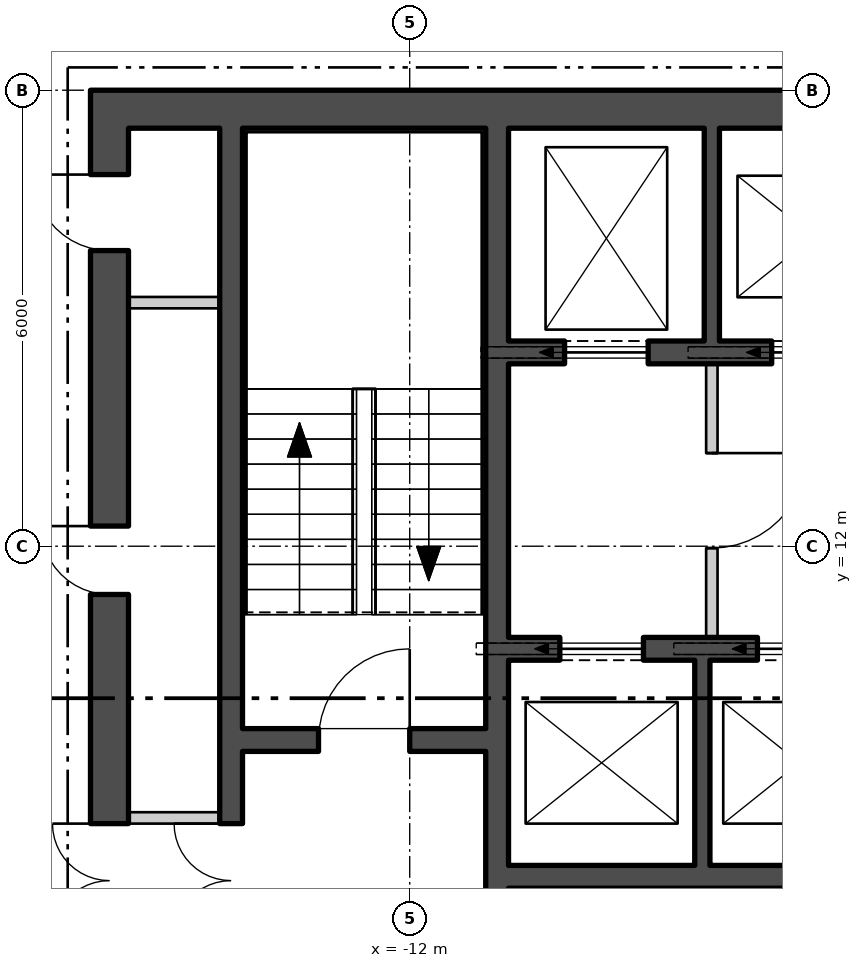
"""IFC4 building model, lengths in metres.
Left out: names, types, materials, properties, quantities, classifications, styles, units other than length and angle.
Written with IfcOpenShell. Run it as: python <this file> out.ifc"""

import sys

from ifc_helpers import new_model, si_unit, direction, frame, frame_2d, origin, place, context, subcontext, project, spatial, polyline, rectangle, outline, extrude, element, fill, save


model = new_model("IFC4")
c1 = context("Model", 3, precision=1e-05, world=origin(), true_north=direction((0.0, 1.0)))
c2 = subcontext(c1, "Body", "Model", "MODEL_VIEW")
j1 = project(units=[si_unit("LENGTHUNIT", "METRE"), si_unit("PLANEANGLEUNIT", "RADIAN")], contexts=[c1])
p1 = place(None, origin())
s1 = spatial("IfcSite", under=j1, at=p1, CompositionType="ELEMENT")
p2 = place(p1, origin())
s2 = spatial("IfcBuilding", under=s1, at=p2, CompositionType="ELEMENT")
p3 = place(p2, frame((0.0, 0.0, 186.6)))
s3 = spatial("IfcBuildingStorey", under=s2, at=p3, CompositionType="ELEMENT", Elevation=186.6)
p4 = place(p3, frame((-26.67, 13.393, -0.18), z_axis=(0.0, 0.0, 1.0), x_axis=(0.500000711659, -0.866024992908, 0.0)))
e1 = element("IfcWall", 1, at=p4, inside=s3, PredefinedType="SOLIDWALL", context=c2, shape_type="SweptSolid", body=[
    extrude(outline(polyline([(-0.13, -0.225), (45.87, -0.225), (45.61, 0.225), (0.13, 0.225), (-0.13, -0.225)])), origin(), (0.0, 0.0, 1.0), 6.0),
])
p5 = place(p4, frame((1.424, 0.0, 1.38)))
e2 = element("IfcOpeningElement", 2, at=p5, cuts=e1, PredefinedType="OPENING", context=c2, shape_type="SweptSolid", body=[
    extrude(rectangle(XDim=2.4, YDim=3.6, at=frame_2d((1.2, 1.8))), frame((0.0, 0.235, 0.0), z_axis=(0.0, -1.0, 0.0), x_axis=(1.0, 0.0, 0.0)), (0.0, 0.0, 1.0), 0.47),
])
p6 = place(p4, frame((5.893, 0.0, 1.38)))
e3 = element("IfcOpeningElement", 3, at=p6, cuts=e1, PredefinedType="OPENING", context=c2, shape_type="SweptSolid", body=[
    extrude(rectangle(XDim=2.4, YDim=3.6, at=frame_2d((1.2, 1.8))), frame((0.0, 0.235, 0.0), z_axis=(0.0, -1.0, 0.0), x_axis=(1.0, 0.0, 0.0)), (0.0, 0.0, 1.0), 0.47),
])
p7 = place(p4, frame((10.401, 0.0, 1.38)))
e4 = element("IfcOpeningElement", 4, at=p7, cuts=e1, PredefinedType="OPENING", context=c2, shape_type="SweptSolid", body=[
    extrude(rectangle(XDim=2.4, YDim=3.6, at=frame_2d((1.2, 1.8))), frame((0.0, 0.235, 0.0), z_axis=(0.0, -1.0, 0.0), x_axis=(1.0, 0.0, 0.0)), (0.0, 0.0, 1.0), 0.47),
])
p8 = place(p4, frame((14.909, 0.0, 1.38)))
e5 = element("IfcOpeningElement", 5, at=p8, cuts=e1, PredefinedType="OPENING", context=c2, shape_type="SweptSolid", body=[
    extrude(rectangle(XDim=2.4, YDim=3.6, at=frame_2d((1.2, 1.8))), frame((0.0, 0.235, 0.0), z_axis=(0.0, -1.0, 0.0), x_axis=(1.0, 0.0, 0.0)), (0.0, 0.0, 1.0), 0.47),
])
p9 = place(p4, frame((19.416, 0.0, 1.38)))
e6 = element("IfcOpeningElement", 6, at=p9, cuts=e1, PredefinedType="OPENING", context=c2, shape_type="SweptSolid", body=[
    extrude(rectangle(XDim=2.4, YDim=3.6, at=frame_2d((1.2, 1.8))), frame((0.0, 0.235, 0.0), z_axis=(0.0, -1.0, 0.0), x_axis=(1.0, 0.0, 0.0)), (0.0, 0.0, 1.0), 0.47),
])
p10 = place(p4, frame((23.924, 0.0, 1.38)))
e7 = element("IfcOpeningElement", 7, at=p10, cuts=e1, PredefinedType="OPENING", context=c2, shape_type="SweptSolid", body=[
    extrude(rectangle(XDim=2.4, YDim=3.6, at=frame_2d((1.2, 1.8))), frame((0.0, 0.235, 0.0), z_axis=(0.0, -1.0, 0.0), x_axis=(1.0, 0.0, 0.0)), (0.0, 0.0, 1.0), 0.47),
])
p11 = place(p4, frame((28.431, 0.0, 1.38)))
e8 = element("IfcOpeningElement", 8, at=p11, cuts=e1, PredefinedType="OPENING", context=c2, shape_type="SweptSolid", body=[
    extrude(rectangle(XDim=2.4, YDim=3.6, at=frame_2d((1.2, 1.8))), frame((0.0, 0.235, 0.0), z_axis=(0.0, -1.0, 0.0), x_axis=(1.0, 0.0, 0.0)), (0.0, 0.0, 1.0), 0.47),
])
p12 = place(p4, frame((32.939, 0.0, 1.38)))
e9 = element("IfcOpeningElement", 9, at=p12, cuts=e1, PredefinedType="OPENING", context=c2, shape_type="SweptSolid", body=[
    extrude(rectangle(XDim=2.4, YDim=3.6, at=frame_2d((1.2, 1.8))), frame((0.0, 0.235, 0.0), z_axis=(0.0, -1.0, 0.0), x_axis=(1.0, 0.0, 0.0)), (0.0, 0.0, 1.0), 0.47),
])
p13 = place(p4, frame((37.447, 0.0, 1.38)))
e10 = element("IfcOpeningElement", 10, at=p13, cuts=e1, PredefinedType="OPENING", context=c2, shape_type="SweptSolid", body=[
    extrude(rectangle(XDim=2.4, YDim=3.6, at=frame_2d((1.2, 1.8))), frame((0.0, 0.235, 0.0), z_axis=(0.0, -1.0, 0.0), x_axis=(1.0, 0.0, 0.0)), (0.0, 0.0, 1.0), 0.47),
])
p14 = place(p4, frame((41.916, 0.0, 1.38)))
e11 = element("IfcOpeningElement", 11, at=p14, cuts=e1, PredefinedType="OPENING", context=c2, shape_type="SweptSolid", body=[
    extrude(rectangle(XDim=2.4, YDim=3.6, at=frame_2d((1.2, 1.8))), frame((0.0, 0.235, 0.0), z_axis=(0.0, -1.0, 0.0), x_axis=(1.0, 0.0, 0.0)), (0.0, 0.0, 1.0), 0.47),
])
p15 = place(p3, frame((-16.2, 17.75, 0.0), z_axis=(0.0, 0.0, 1.0), x_axis=(1.0, 0.0, 0.0)))
e12 = element("IfcWall", 12, at=p15, inside=s3, PredefinedType="SHEAR", context=c2, shape_type="SweptSolid", body=[
    extrude(rectangle(XDim=32.4, YDim=0.5, at=frame_2d((16.2, 0.0))), origin(), (0.0, 0.0, 1.0), 5.8),
])
p16 = place(p3, frame((-15.95, 2.5, 0.0), z_axis=(0.0, 0.0, 1.0), x_axis=(0.0, 1.0, 0.0)))
e13 = element("IfcWall", 13, at=p16, inside=s3, PredefinedType="SHEAR", context=c2, shape_type="SweptSolid", body=[
    extrude(rectangle(XDim=15.0, YDim=0.5, at=frame_2d((7.5, 0.0))), origin(), (0.0, 0.0, 1.0), 5.8),
])
p17 = place(p16, frame((4.35, 0.0, 0.0)))
e14 = element("IfcOpeningElement", 14, at=p17, cuts=e13, PredefinedType="OPENING", context=c2, shape_type="SweptSolid", body=[
    extrude(rectangle(XDim=1.5, YDim=2.1, at=frame_2d((0.75, 1.05))), frame((0.0, 0.26, 0.0), z_axis=(0.0, -1.0, 0.0), x_axis=(1.0, 0.0, 0.0)), (0.0, 0.0, 1.0), 0.52),
])
p18 = place(p16, frame((0.798, 0.0, 0.0)))
e15 = element("IfcOpeningElement", 15, at=p18, cuts=e13, PredefinedType="OPENING", context=c2, shape_type="SweptSolid", body=[
    extrude(rectangle(XDim=0.9, YDim=2.1, at=frame_2d((0.45, 1.05))), frame((0.0, 0.26, 0.0), z_axis=(0.0, -1.0, 0.0), x_axis=(1.0, 0.0, 0.0)), (0.0, 0.0, 1.0), 0.52),
])
p19 = place(p16, frame((2.973, 0.0, 0.0)))
e16 = element("IfcOpeningElement", 16, at=p19, cuts=e13, PredefinedType="OPENING", context=c2, shape_type="SweptSolid", body=[
    extrude(rectangle(XDim=0.9, YDim=2.1, at=frame_2d((0.45, 1.05))), frame((0.0, 0.26, 0.0), z_axis=(0.0, -1.0, 0.0), x_axis=(1.0, 0.0, 0.0)), (0.0, 0.0, 1.0), 0.52),
])
p20 = place(p16, frame((8.865, 0.0, 0.0)))
e17 = element("IfcOpeningElement", 17, at=p20, cuts=e13, PredefinedType="OPENING", context=c2, shape_type="SweptSolid", body=[
    extrude(rectangle(XDim=0.9, YDim=2.1, at=frame_2d((0.45, 1.05))), frame((0.0, 0.26, 0.0), z_axis=(0.0, -1.0, 0.0), x_axis=(1.0, 0.0, 0.0)), (0.0, 0.0, 1.0), 0.52),
])
p21 = place(p16, frame((13.39, 0.0, 0.0)))
e18 = element("IfcOpeningElement", 18, at=p21, cuts=e13, PredefinedType="OPENING", context=c2, shape_type="SweptSolid", body=[
    extrude(rectangle(XDim=1.0, YDim=2.1, at=frame_2d((0.5, 1.05))), frame((0.0, 0.26, 0.0), z_axis=(0.0, -1.0, 0.0), x_axis=(1.0, 0.0, 0.0)), (0.0, 0.0, 1.0), 0.52),
])
p22 = place(p3, frame((-10.85, 2.5, 0.0), z_axis=(0.0, 0.0, 1.0), x_axis=(0.0, 1.0, 0.0)))
e19 = element("IfcWall", 19, at=p22, inside=s3, PredefinedType="SHEAR", context=c2, shape_type="SweptSolid", body=[
    extrude(rectangle(XDim=15.0, YDim=0.3, at=frame_2d((7.5, 0.0))), origin(), (0.0, 0.0, 1.0), 5.8),
])
p23 = place(p22, frame((3.475, 0.0, 0.0)))
e20 = element("IfcOpeningElement", 20, at=p23, cuts=e19, PredefinedType="OPENING", context=c2, shape_type="SweptSolid", body=[
    extrude(rectangle(XDim=1.25, YDim=2.1, at=frame_2d((0.625, 1.05))), frame((0.0, 0.16, 0.0), z_axis=(0.0, -1.0, 0.0), x_axis=(1.0, 0.0, 0.0)), (0.0, 0.0, 1.0), 0.32),
])
p24 = place(p22, frame((1.125, 0.0, 0.0)))
e21 = element("IfcOpeningElement", 21, at=p24, cuts=e19, PredefinedType="OPENING", context=c2, shape_type="SweptSolid", body=[
    extrude(rectangle(XDim=1.0, YDim=2.1, at=frame_2d((0.5, 1.05))), frame((0.0, 0.16, 0.0), z_axis=(0.0, -1.0, 0.0), x_axis=(1.0, 0.0, 0.0)), (0.0, 0.0, 1.0), 0.32),
])
p25 = place(p3, frame((-14.35, 2.5, 0.0), z_axis=(0.0, 0.0, 1.0), x_axis=(0.0, 1.0, 0.0)))
e22 = element("IfcWall", 22, at=p25, inside=s3, PredefinedType="SHEAR", context=c2, shape_type="SweptSolid", body=[
    extrude(rectangle(XDim=15.0, YDim=0.3, at=frame_2d((7.5, 0.0))), origin(), (0.0, 0.0, 1.0), 5.8),
])
p26 = place(p25, frame((4.35, 0.0, 0.0)))
e23 = element("IfcOpeningElement", 23, at=p26, cuts=e22, PredefinedType="OPENING", context=c2, shape_type="SweptSolid", body=[
    extrude(rectangle(XDim=1.5, YDim=2.1, at=frame_2d((0.75, 1.05))), frame((0.0, 0.16, 0.0), z_axis=(0.0, -1.0, 0.0), x_axis=(1.0, 0.0, 0.0)), (0.0, 0.0, 1.0), 0.32),
])
p27 = place(p3, frame((-14.2, 9.45, 0.0), z_axis=(0.0, 0.0, 1.0), x_axis=(1.0, 0.0, 0.0)))
e24 = element("IfcWall", 24, at=p27, inside=s3, PredefinedType="SHEAR", context=c2, shape_type="SweptSolid", body=[
    extrude(rectangle(XDim=3.2, YDim=0.3, at=frame_2d((1.6, 0.0))), origin(), (0.0, 0.0, 1.0), 5.8),
])
p28 = place(p27, frame((1.0, 0.0, 0.0)))
e25 = element("IfcOpeningElement", 25, at=p28, cuts=e24, PredefinedType="OPENING", context=c2, shape_type="SweptSolid", body=[
    extrude(rectangle(XDim=1.2, YDim=2.1, at=frame_2d((0.6, 1.05))), frame((0.0, 0.16, 0.0), z_axis=(0.0, -1.0, 0.0), x_axis=(1.0, 0.0, 0.0)), (0.0, 0.0, 1.0), 0.32),
])
p29 = place(p3, frame((-10.7, 14.55, 0.0), z_axis=(0.0, 0.0, 1.0), x_axis=(1.0, 0.0, 0.0)))
e26 = element("IfcWall", 26, at=p29, inside=s3, PredefinedType="SHEAR", context=c2, shape_type="SweptSolid", body=[
    extrude(rectangle(XDim=21.4, YDim=0.3, at=frame_2d((10.7, 0.0))), origin(), (0.0, 0.0, 1.0), 5.8),
])
p30 = place(p29, frame((0.738, 0.0, 0.0)))
e27 = element("IfcOpeningElement", 27, at=p30, cuts=e26, PredefinedType="OPENING", context=c2, shape_type="SweptSolid", body=[
    extrude(rectangle(XDim=1.1, YDim=2.1, at=frame_2d((0.55, 1.05))), frame((0.0, 0.16, 0.0), z_axis=(0.0, -1.0, 0.0), x_axis=(1.0, 0.0, 0.0)), (0.0, 0.0, 1.0), 0.32),
])
p31 = place(p29, frame((3.462, 0.0, 0.0)))
e28 = element("IfcOpeningElement", 28, at=p31, cuts=e26, PredefinedType="OPENING", context=c2, shape_type="SweptSolid", body=[
    extrude(rectangle(XDim=1.1, YDim=2.1, at=frame_2d((0.55, 1.05))), frame((0.0, 0.16, 0.0), z_axis=(0.0, -1.0, 0.0), x_axis=(1.0, 0.0, 0.0)), (0.0, 0.0, 1.0), 0.32),
])
p32 = place(p29, frame((6.138, 0.0, 0.0)))
e29 = element("IfcOpeningElement", 29, at=p32, cuts=e26, PredefinedType="OPENING", context=c2, shape_type="SweptSolid", body=[
    extrude(rectangle(XDim=1.1, YDim=2.1, at=frame_2d((0.55, 1.05))), frame((0.0, 0.16, 0.0), z_axis=(0.0, -1.0, 0.0), x_axis=(1.0, 0.0, 0.0)), (0.0, 0.0, 1.0), 0.32),
])
p33 = place(p29, frame((8.812, 0.0, 0.0)))
e30 = element("IfcOpeningElement", 30, at=p33, cuts=e26, PredefinedType="OPENING", context=c2, shape_type="SweptSolid", body=[
    extrude(rectangle(XDim=1.1, YDim=2.1, at=frame_2d((0.55, 1.05))), frame((0.0, 0.16, 0.0), z_axis=(0.0, -1.0, 0.0), x_axis=(1.0, 0.0, 0.0)), (0.0, 0.0, 1.0), 0.32),
])
p34 = place(p29, frame((19.562, 0.0, 0.0)))
e31 = element("IfcOpeningElement", 31, at=p34, cuts=e26, PredefinedType="OPENING", context=c2, shape_type="SweptSolid", body=[
    extrude(rectangle(XDim=1.1, YDim=2.1, at=frame_2d((0.55, 1.05))), frame((0.0, 0.16, 0.0), z_axis=(0.0, -1.0, 0.0), x_axis=(1.0, 0.0, 0.0)), (0.0, 0.0, 1.0), 0.32),
])
p35 = place(p29, frame((14.213, 0.0, 0.0)))
e32 = element("IfcOpeningElement", 32, at=p35, cuts=e26, PredefinedType="OPENING", context=c2, shape_type="SweptSolid", body=[
    extrude(rectangle(XDim=1.0, YDim=2.1, at=frame_2d((0.5, 1.05))), frame((0.0, 0.16, 0.0), z_axis=(0.0, -1.0, 0.0), x_axis=(1.0, 0.0, 0.0)), (0.0, 0.0, 1.0), 0.32),
])
p36 = place(p3, frame((-10.7, 10.65, 0.0), z_axis=(0.0, 0.0, 1.0), x_axis=(1.0, 0.0, 0.0)))
e33 = element("IfcWall", 33, at=p36, inside=s3, PredefinedType="SHEAR", context=c2, shape_type="SweptSolid", body=[
    extrude(rectangle(XDim=10.3, YDim=0.3, at=frame_2d((5.15, 0.0))), origin(), (0.0, 0.0, 1.0), 5.8),
])
p37 = place(p36, frame((0.675, 0.0, 0.0)))
e34 = element("IfcOpeningElement", 34, at=p37, cuts=e33, PredefinedType="OPENING", context=c2, shape_type="SweptSolid", body=[
    extrude(rectangle(XDim=1.1, YDim=2.1, at=frame_2d((0.55, 1.05))), frame((0.0, 0.16, 0.0), z_axis=(0.0, -1.0, 0.0), x_axis=(1.0, 0.0, 0.0)), (0.0, 0.0, 1.0), 0.32),
])
p38 = place(p36, frame((3.275, 0.0, 0.0)))
e35 = element("IfcOpeningElement", 35, at=p38, cuts=e33, PredefinedType="OPENING", context=c2, shape_type="SweptSolid", body=[
    extrude(rectangle(XDim=1.1, YDim=2.1, at=frame_2d((0.55, 1.05))), frame((0.0, 0.16, 0.0), z_axis=(0.0, -1.0, 0.0), x_axis=(1.0, 0.0, 0.0)), (0.0, 0.0, 1.0), 0.32),
])
p39 = place(p36, frame((5.825, 0.0, 0.0)))
e36 = element("IfcOpeningElement", 36, at=p39, cuts=e33, PredefinedType="OPENING", context=c2, shape_type="SweptSolid", body=[
    extrude(rectangle(XDim=1.1, YDim=2.1, at=frame_2d((0.55, 1.05))), frame((0.0, 0.16, 0.0), z_axis=(0.0, -1.0, 0.0), x_axis=(1.0, 0.0, 0.0)), (0.0, 0.0, 1.0), 0.32),
])
p40 = place(p36, frame((8.425, 0.0, 0.0)))
e37 = element("IfcOpeningElement", 37, at=p40, cuts=e33, PredefinedType="OPENING", context=c2, shape_type="SweptSolid", body=[
    extrude(rectangle(XDim=1.0, YDim=2.1, at=frame_2d((0.5, 1.05))), frame((0.0, 0.16, 0.0), z_axis=(0.0, -1.0, 0.0), x_axis=(1.0, 0.0, 0.0)), (0.0, 0.0, 1.0), 0.32),
])
p41 = place(p3, frame((-10.7, 7.65, 0.0), z_axis=(0.0, 0.0, 1.0), x_axis=(1.0, 0.0, 0.0)))
e38 = element("IfcWall", 38, at=p41, inside=s3, PredefinedType="SHEAR", context=c2, shape_type="SweptSolid", body=[
    extrude(rectangle(XDim=10.3, YDim=0.3, at=frame_2d((5.15, 0.0))), origin(), (0.0, 0.0, 1.0), 5.8),
])
p42 = place(p3, frame((-8.025, 14.7, 0.0), z_axis=(0.0, 0.0, 1.0), x_axis=(0.0, 1.0, 0.0)))
e39 = element("IfcWall", 39, at=p42, inside=s3, PredefinedType="SHEAR", context=c2, shape_type="SweptSolid", body=[
    extrude(rectangle(XDim=2.8, YDim=0.2, at=frame_2d((1.4, 0.0))), origin(), (0.0, 0.0, 1.0), 5.8),
])
p43 = place(p3, frame((-8.15, 7.8, 0.0), z_axis=(0.0, 0.0, 1.0), x_axis=(0.0, 1.0, 0.0)))
e40 = element("IfcWall", 40, at=p43, inside=s3, PredefinedType="SHEAR", context=c2, shape_type="SweptSolid", body=[
    extrude(rectangle(XDim=2.7, YDim=0.2, at=frame_2d((1.35, 0.0))), origin(), (0.0, 0.0, 1.0), 5.8),
])
p44 = place(p3, frame((-8.025, 10.8, 0.0), z_axis=(0.0, 0.0, 1.0), x_axis=(0.0, 1.0, 0.0)))
e41 = element("IfcWall", 41, at=p44, inside=s3, PredefinedType="PARTITIONING", context=c2, shape_type="SweptSolid", body=[
    extrude(rectangle(XDim=3.6, YDim=0.15, at=frame_2d((1.8, 0.0))), origin(), (0.0, 0.0, 1.0), 5.8),
])
p45 = place(p44, frame((1.175, 0.0, 0.0)))
e42 = element("IfcOpeningElement", 42, at=p45, cuts=e41, PredefinedType="OPENING", context=c2, shape_type="SweptSolid", body=[
    extrude(rectangle(XDim=1.25, YDim=2.1, at=frame_2d((0.625, 1.05))), frame((0.0, 0.085, 0.0), z_axis=(0.0, -1.0, 0.0), x_axis=(1.0, 0.0, 0.0)), (0.0, 0.0, 1.0), 0.17),
])
for number, where, z_axis, x_axis in (
    (43, (-15.7, 8.425, 0.0), (0.0, 0.0, 1.0), (1.0, 0.0, 0.0)),
    (44, (-15.7, 15.205, 0.0), (0.0, 0.0, 1.0), (1.0, 0.0, 0.0)),
):
    element("IfcWall", number, at=place(p3, frame(where, z_axis=z_axis, x_axis=x_axis)), inside=s3, PredefinedType="PARTITIONING", context=c2, shape_type="SweptSolid", body=[
        extrude(rectangle(XDim=1.2, YDim=0.15, at=frame_2d((0.6, 0.0))), origin(), (0.0, 0.0, 1.0), 5.8),
    ])
p46 = place(p30, origin())
e45 = element("IfcDoor", 45, at=p46, inside=s3, OperationType="SLIDING_TO_LEFT", PredefinedType="DOOR", context=c2, shape_type="SweptSolid", body=[
    extrude(rectangle(XDim=1.1, YDim=2.1, at=frame_2d((0.55, 1.05))), frame((0.0, 0.025, 0.0), z_axis=(0.0, -1.0, 0.0), x_axis=(1.0, 0.0, 0.0)), (0.0, 0.0, 1.0), 0.05),
])
fill(e27, e45)
p47 = place(p31, origin())
e46 = element("IfcDoor", 46, at=p47, inside=s3, OperationType="SLIDING_TO_LEFT", PredefinedType="DOOR", context=c2, shape_type="SweptSolid", body=[
    extrude(rectangle(XDim=1.1, YDim=2.1, at=frame_2d((0.55, 1.05))), frame((0.0, 0.025, 0.0), z_axis=(0.0, -1.0, 0.0), x_axis=(1.0, 0.0, 0.0)), (0.0, 0.0, 1.0), 0.05),
])
fill(e28, e46)
p48 = place(p37, origin())
e47 = element("IfcDoor", 47, at=p48, inside=s3, OperationType="SLIDING_TO_LEFT", PredefinedType="DOOR", context=c2, shape_type="SweptSolid", body=[
    extrude(rectangle(XDim=1.1, YDim=2.1, at=frame_2d((0.55, 1.05))), frame((0.0, 0.025, 0.0), z_axis=(0.0, -1.0, 0.0), x_axis=(1.0, 0.0, 0.0)), (0.0, 0.0, 1.0), 0.05),
])
fill(e34, e47)
p49 = place(p38, origin())
e48 = element("IfcDoor", 48, at=p49, inside=s3, OperationType="SLIDING_TO_LEFT", PredefinedType="DOOR", context=c2, shape_type="SweptSolid", body=[
    extrude(rectangle(XDim=1.1, YDim=2.1, at=frame_2d((0.55, 1.05))), frame((0.0, 0.025, 0.0), z_axis=(0.0, -1.0, 0.0), x_axis=(1.0, 0.0, 0.0)), (0.0, 0.0, 1.0), 0.05),
])
fill(e35, e48)
p50 = place(p45, origin())
e49 = element("IfcDoor", 49, at=p50, inside=s3, OperationType="SINGLE_SWING_RIGHT", PredefinedType="DOOR", context=c2, shape_type="SweptSolid", body=[
    extrude(rectangle(XDim=1.25, YDim=2.1, at=frame_2d((0.625, 1.05))), frame((0.0, 0.025, 0.0), z_axis=(0.0, -1.0, 0.0), x_axis=(1.0, 0.0, 0.0)), (0.0, 0.0, 1.0), 0.05),
])
fill(e42, e49)
p51 = place(p28, origin())
e50 = element("IfcDoor", 50, at=p51, inside=s3, OperationType="SINGLE_SWING_LEFT", PredefinedType="DOOR", context=c2, shape_type="SweptSolid", body=[
    extrude(rectangle(XDim=1.2, YDim=2.1, at=frame_2d((0.6, 1.05))), frame((0.0, 0.025, 0.0), z_axis=(0.0, -1.0, 0.0), x_axis=(1.0, 0.0, 0.0)), (0.0, 0.0, 1.0), 0.05),
])
fill(e25, e50)
p52 = place(p26, origin())
e51 = element("IfcDoor", 51, at=p52, inside=s3, OperationType="DOUBLE_DOOR_SINGLE_SWING", PredefinedType="DOOR", context=c2, shape_type="SweptSolid", body=[
    extrude(rectangle(XDim=1.5, YDim=2.1, at=frame_2d((0.75, 1.05))), frame((0.0, 0.025, 0.0), z_axis=(0.0, -1.0, 0.0), x_axis=(1.0, 0.0, 0.0)), (0.0, 0.0, 1.0), 0.05),
])
fill(e23, e51)
p53 = place(p17, origin())
e52 = element("IfcDoor", 52, at=p53, inside=s3, OperationType="DOUBLE_DOOR_SINGLE_SWING", PredefinedType="DOOR", context=c2, shape_type="SweptSolid", body=[
    extrude(rectangle(XDim=1.5, YDim=2.1, at=frame_2d((0.75, 1.05))), frame((0.0, 0.025, 0.0), z_axis=(0.0, -1.0, 0.0), x_axis=(1.0, 0.0, 0.0)), (0.0, 0.0, 1.0), 0.05),
])
fill(e14, e52)
p54 = place(p20, origin())
e53 = element("IfcDoor", 53, at=p54, inside=s3, OperationType="SINGLE_SWING_LEFT", PredefinedType="DOOR", context=c2, shape_type="SweptSolid", body=[
    extrude(rectangle(XDim=0.9, YDim=2.1, at=frame_2d((0.45, 1.05))), frame((0.0, 0.025, 0.0), z_axis=(0.0, -1.0, 0.0), x_axis=(1.0, 0.0, 0.0)), (0.0, 0.0, 1.0), 0.05),
])
fill(e17, e53)
p55 = place(p21, origin())
e54 = element("IfcDoor", 54, at=p55, inside=s3, OperationType="SINGLE_SWING_LEFT", PredefinedType="DOOR", context=c2, shape_type="SweptSolid", body=[
    extrude(rectangle(XDim=1.0, YDim=2.1, at=frame_2d((0.5, 1.05))), frame((0.0, 0.025, 0.0), z_axis=(0.0, -1.0, 0.0), x_axis=(1.0, 0.0, 0.0)), (0.0, 0.0, 1.0), 0.05),
])
fill(e18, e54)
save(model, sys.argv[1])
